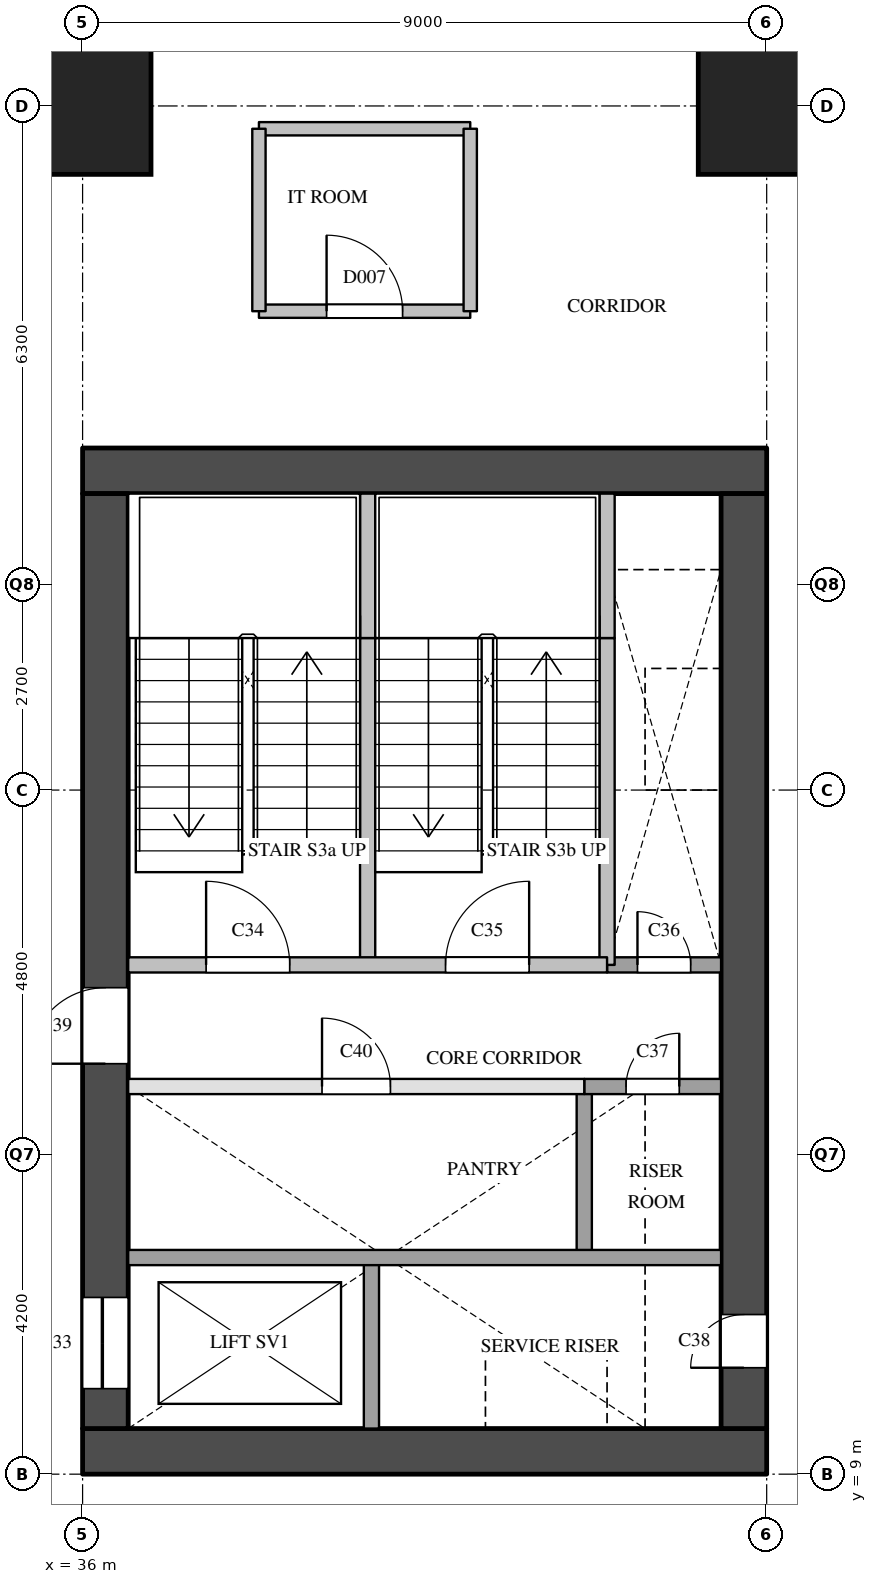
"""IFC4 building model, lengths in metres.
Left out: names, types, materials, properties, quantities, classifications, styles, units other than length and angle.
Written with IfcOpenShell. Run it as: python <this file> out.ifc"""

import sys

from ifc_helpers import new_model, si_unit, direction, frame, frame_2d, origin, origin_2d, place, context, subcontext, project, spatial, rectangle, extrude, element, fill, save


model = new_model("IFC4")
c1 = context("Model", 3, precision=1e-05, world=origin(), true_north=direction((0.0, 1.0)))
c2 = subcontext(c1, "Body", "Model", "MODEL_VIEW")
j1 = project(units=[si_unit("LENGTHUNIT", "METRE"), si_unit("PLANEANGLEUNIT", "RADIAN")], contexts=[c1])
p1 = place(None, origin())
s1 = spatial("IfcSite", under=j1, at=p1, CompositionType="ELEMENT")
p2 = place(p1, origin())
s2 = spatial("IfcBuilding", under=s1, at=p2, CompositionType="ELEMENT")
p3 = place(p2, frame((0.0, 0.0, 77.8)))
s3 = spatial("IfcBuildingStorey", under=s2, at=p3, CompositionType="ELEMENT", Elevation=77.8)
for number, where, z_axis, x_axis in (
    (1, (36.0, 27.0, 0.0), (0.0, 0.0, 1.0), (1.0, 0.0, 0.0)),
    (2, (45.0, 27.0, 0.0), (0.0, 0.0, 1.0), (1.0, 0.0, 0.0)),
):
    element("IfcColumn", number, at=place(p3, frame(where, z_axis=z_axis, x_axis=x_axis)), inside=s3, PredefinedType="COLUMN", context=c2, shape_type="SweptSolid", body=[
        extrude(rectangle(XDim=1.8, YDim=1.8, at=origin_2d()), origin(), (0.0, 0.0, 1.0), 3.8),
    ])
for number, where, z_axis, x_axis in (
    (3, (36.0, 9.3, 0.0), (0.0, 0.0, 1.0), (1.0, 0.0, 0.0)),
    (4, (36.0, 22.2, 0.0), (0.0, 0.0, 1.0), (1.0, 0.0, 0.0)),
):
    element("IfcWall", number, at=place(p3, frame(where, z_axis=z_axis, x_axis=x_axis)), inside=s3, PredefinedType="SHEAR", context=c2, shape_type="SweptSolid", body=[
        extrude(rectangle(XDim=9.0, YDim=0.6, at=frame_2d((4.5, 0.0))), origin(), (0.0, 0.0, 1.0), 3.5),
    ])
p4 = place(p3, frame((36.3, 9.6, 0.0), z_axis=(0.0, 0.0, 1.0), x_axis=(0.0, 1.0, 0.0)))
e5 = element("IfcWall", 5, at=p4, inside=s3, PredefinedType="SHEAR", context=c2, shape_type="SweptSolid", body=[
    extrude(rectangle(XDim=12.3, YDim=0.6, at=frame_2d((6.15, 0.0))), origin(), (0.0, 0.0, 1.0), 3.5),
])
p5 = place(p4, frame((0.525, 0.0, 0.0)))
e6 = element("IfcOpeningElement", 6, at=p5, cuts=e5, PredefinedType="OPENING", context=c2, shape_type="SweptSolid", body=[
    extrude(rectangle(XDim=1.2, YDim=2.1, at=frame_2d((0.6, 1.05))), frame((0.0, 0.31, 0.0), z_axis=(0.0, -1.0, 0.0), x_axis=(1.0, 0.0, 0.0)), (0.0, 0.0, 1.0), 0.62),
])
p6 = place(p4, frame((4.8, 0.0, 0.0)))
e7 = element("IfcOpeningElement", 7, at=p6, cuts=e5, PredefinedType="OPENING", context=c2, shape_type="SweptSolid", body=[
    extrude(rectangle(XDim=1.0, YDim=2.1, at=frame_2d((0.5, 1.05))), frame((0.0, 0.31, 0.0), z_axis=(0.0, -1.0, 0.0), x_axis=(1.0, 0.0, 0.0)), (0.0, 0.0, 1.0), 0.62),
])
p7 = place(p3, frame((44.7, 9.6, 0.0), z_axis=(0.0, 0.0, 1.0), x_axis=(0.0, 1.0, 0.0)))
e8 = element("IfcWall", 8, at=p7, inside=s3, PredefinedType="SHEAR", context=c2, shape_type="SweptSolid", body=[
    extrude(rectangle(XDim=12.3, YDim=0.6, at=frame_2d((6.15, 0.0))), origin(), (0.0, 0.0, 1.0), 3.5),
])
p8 = place(p7, frame((0.8, 0.0, 0.0)))
e9 = element("IfcOpeningElement", 9, at=p8, cuts=e8, PredefinedType="OPENING", context=c2, shape_type="SweptSolid", body=[
    extrude(rectangle(XDim=0.7, YDim=2.1, at=frame_2d((0.35, 1.05))), frame((0.0, 0.31, 0.0), z_axis=(0.0, -1.0, 0.0), x_axis=(1.0, 0.0, 0.0)), (0.0, 0.0, 1.0), 0.62),
])
p9 = place(p3, frame((39.75, 15.7, 0.0), z_axis=(0.0, 0.0, 1.0), x_axis=(0.0, 1.0, 0.0)))
e10 = element("IfcWall", 10, at=p9, inside=s3, PredefinedType="SOLIDWALL", context=c2, shape_type="SweptSolid", body=[
    extrude(rectangle(XDim=4.3, YDim=0.2, at=frame_2d((2.15, 0.0))), origin(), (0.0, 0.0, 1.0), 3.5),
])
p10 = place(p3, frame((39.75, 20.0, 0.0), z_axis=(0.0, 0.0, 1.0), x_axis=(0.0, 1.0, 0.0)))
e11 = element("IfcWall", 11, at=p10, inside=s3, PredefinedType="SOLIDWALL", context=c2, shape_type="SweptSolid", body=[
    extrude(rectangle(XDim=1.9, YDim=0.2, at=frame_2d((0.95, 0.0))), origin(), (0.0, 0.0, 1.0), 3.5),
])
p11 = place(p3, frame((39.8, 9.6, 0.0), z_axis=(0.0, 0.0, 1.0), x_axis=(0.0, 1.0, 0.0)))
e12 = element("IfcWall", 12, at=p11, inside=s3, PredefinedType="SOLIDWALL", context=c2, shape_type="SweptSolid", body=[
    extrude(rectangle(XDim=2.3, YDim=0.2, at=frame_2d((1.15, 0.0))), origin(), (0.0, 0.0, 1.0), 3.5),
])
p12 = place(p3, frame((42.6, 11.9, 0.0), z_axis=(0.0, 0.0, 1.0), x_axis=(0.0, 1.0, 0.0)))
e13 = element("IfcWall", 13, at=p12, inside=s3, PredefinedType="SOLIDWALL", context=c2, shape_type="SweptSolid", body=[
    extrude(rectangle(XDim=2.2, YDim=0.2, at=frame_2d((1.1, 0.0))), origin(), (0.0, 0.0, 1.0), 3.5),
])
p13 = place(p3, frame((42.9, 15.7, 0.0), z_axis=(0.0, 0.0, 1.0), x_axis=(0.0, 1.0, 0.0)))
e14 = element("IfcWall", 14, at=p13, inside=s3, PredefinedType="SOLIDWALL", context=c2, shape_type="SweptSolid", body=[
    extrude(rectangle(XDim=4.3, YDim=0.2, at=frame_2d((2.15, 0.0))), origin(), (0.0, 0.0, 1.0), 3.5),
])
p14 = place(p3, frame((42.9, 20.0, 0.0), z_axis=(0.0, 0.0, 1.0), x_axis=(0.0, 1.0, 0.0)))
e15 = element("IfcWall", 15, at=p14, inside=s3, PredefinedType="SOLIDWALL", context=c2, shape_type="SweptSolid", body=[
    extrude(rectangle(XDim=1.9, YDim=0.2, at=frame_2d((0.95, 0.0))), origin(), (0.0, 0.0, 1.0), 3.5),
])
p15 = place(p3, frame((36.6, 11.85, 0.0), z_axis=(0.0, 0.0, 1.0), x_axis=(1.0, 0.0, 0.0)))
e16 = element("IfcWall", 16, at=p15, inside=s3, PredefinedType="SOLIDWALL", context=c2, shape_type="SweptSolid", body=[
    extrude(rectangle(XDim=7.8, YDim=0.2, at=frame_2d((3.9, 0.0))), origin(), (0.0, 0.0, 1.0), 3.5),
])
p16 = place(p3, frame((36.6, 14.1, 0.0), z_axis=(0.0, 0.0, 1.0), x_axis=(1.0, 0.0, 0.0)))
e17 = element("IfcWall", 17, at=p16, inside=s3, PredefinedType="PARTITIONING", context=c2, shape_type="SweptSolid", body=[
    extrude(rectangle(XDim=6.0, YDim=0.2, at=frame_2d((3.0, 0.0))), origin(), (0.0, 0.0, 1.0), 3.5),
])
p17 = place(p16, frame((2.55, 0.0, 0.0)))
e18 = element("IfcOpeningElement", 18, at=p17, cuts=e17, PredefinedType="OPENING", context=c2, shape_type="SweptSolid", body=[
    extrude(rectangle(XDim=0.9, YDim=2.1, at=frame_2d((0.45, 1.05))), frame((0.0, 0.11, 0.0), z_axis=(0.0, -1.0, 0.0), x_axis=(1.0, 0.0, 0.0)), (0.0, 0.0, 1.0), 0.22),
])
p18 = place(p3, frame((42.6, 14.1, 0.0), z_axis=(0.0, 0.0, 1.0), x_axis=(1.0, 0.0, 0.0)))
e19 = element("IfcWall", 19, at=p18, inside=s3, PredefinedType="SOLIDWALL", context=c2, shape_type="SweptSolid", body=[
    extrude(rectangle(XDim=1.8, YDim=0.2, at=frame_2d((0.9, 0.0))), origin(), (0.0, 0.0, 1.0), 3.5),
])
p19 = place(p18, frame((0.55, 0.0, 0.0)))
e20 = element("IfcOpeningElement", 20, at=p19, cuts=e19, PredefinedType="OPENING", context=c2, shape_type="SweptSolid", body=[
    extrude(rectangle(XDim=0.7, YDim=2.1, at=frame_2d((0.35, 1.05))), frame((0.0, 0.11, 0.0), z_axis=(0.0, -1.0, 0.0), x_axis=(1.0, 0.0, 0.0)), (0.0, 0.0, 1.0), 0.22),
])
p20 = place(p3, frame((42.9, 15.7, 0.0), z_axis=(0.0, 0.0, 1.0), x_axis=(1.0, 0.0, 0.0)))
e21 = element("IfcWall", 21, at=p20, inside=s3, PredefinedType="SOLIDWALL", context=c2, shape_type="SweptSolid", body=[
    extrude(rectangle(XDim=1.5, YDim=0.2, at=frame_2d((0.75, 0.0))), origin(), (0.0, 0.0, 1.0), 3.5),
])
p21 = place(p20, frame((0.4, 0.0, 0.0)))
e22 = element("IfcOpeningElement", 22, at=p21, cuts=e21, PredefinedType="OPENING", context=c2, shape_type="SweptSolid", body=[
    extrude(rectangle(XDim=0.7, YDim=2.1, at=frame_2d((0.35, 1.05))), frame((0.0, 0.11, 0.0), z_axis=(0.0, -1.0, 0.0), x_axis=(1.0, 0.0, 0.0)), (0.0, 0.0, 1.0), 0.22),
])
p22 = place(p3, frame((36.6, 15.7, 0.0), z_axis=(0.0, 0.0, 1.0), x_axis=(1.0, 0.0, 0.0)))
e23 = element("IfcWall", 23, at=p22, inside=s3, PredefinedType="SOLIDWALL", context=c2, shape_type="SweptSolid", body=[
    extrude(rectangle(XDim=6.3, YDim=0.2, at=frame_2d((3.15, 0.0))), origin(), (0.0, 0.0, 1.0), 3.5),
])
p23 = place(p22, frame((1.025, 0.0, 0.0)))
e24 = element("IfcOpeningElement", 24, at=p23, cuts=e23, PredefinedType="OPENING", context=c2, shape_type="SweptSolid", body=[
    extrude(rectangle(XDim=1.1, YDim=2.1, at=frame_2d((0.55, 1.05))), frame((0.0, 0.11, 0.0), z_axis=(0.0, -1.0, 0.0), x_axis=(1.0, 0.0, 0.0)), (0.0, 0.0, 1.0), 0.22),
])
p24 = place(p22, frame((4.175, 0.0, 0.0)))
e25 = element("IfcOpeningElement", 25, at=p24, cuts=e23, PredefinedType="OPENING", context=c2, shape_type="SweptSolid", body=[
    extrude(rectangle(XDim=1.1, YDim=2.1, at=frame_2d((0.55, 1.05))), frame((0.0, 0.11, 0.0), z_axis=(0.0, -1.0, 0.0), x_axis=(1.0, 0.0, 0.0)), (0.0, 0.0, 1.0), 0.22),
])
p25 = place(p3, frame((38.32, 24.3, 0.0), z_axis=(0.0, 0.0, 1.0), x_axis=(1.0, 0.0, 0.0)))
e26 = element("IfcWall", 26, at=p25, inside=s3, PredefinedType="PARTITIONING", context=c2, shape_type="SweptSolid", body=[
    extrude(rectangle(XDim=2.78, YDim=0.175, at=frame_2d((1.39, 0.0))), origin(), (0.0, 0.0, 1.0), 3.5),
])
p26 = place(p25, frame((0.89, 0.0, 0.0)))
e27 = element("IfcOpeningElement", 27, at=p26, cuts=e26, PredefinedType="OPENING", context=c2, shape_type="SweptSolid", body=[
    extrude(rectangle(XDim=1.0, YDim=2.1, at=frame_2d((0.5, 1.05))), frame((0.0, 0.097, 0.0), z_axis=(0.0, -1.0, 0.0), x_axis=(1.0, 0.0, 0.0)), (0.0, 0.0, 1.0), 0.195),
])
p27 = place(p3, frame((38.32, 26.7, 0.0), z_axis=(0.0, 0.0, 1.0), x_axis=(1.0, 0.0, 0.0)))
e28 = element("IfcWall", 28, at=p27, inside=s3, PredefinedType="PARTITIONING", context=c2, shape_type="SweptSolid", body=[
    extrude(rectangle(XDim=2.78, YDim=0.175, at=frame_2d((1.39, 0.0))), origin(), (0.0, 0.0, 1.0), 2.5),
])
for number, where, z_axis, x_axis in (
    (29, (38.32, 24.3, 0.0), (0.0, 0.0, 1.0), (0.0, 1.0, 0.0)),
    (30, (41.1, 24.3, 0.0), (0.0, 0.0, 1.0), (0.0, 1.0, 0.0)),
):
    element("IfcWall", number, at=place(p3, frame(where, z_axis=z_axis, x_axis=x_axis)), inside=s3, PredefinedType="PARTITIONING", context=c2, shape_type="SweptSolid", body=[
        extrude(rectangle(XDim=2.4, YDim=0.175, at=frame_2d((1.2, 0.0))), origin(), (0.0, 0.0, 1.0), 2.5),
    ])
p28 = place(p5, origin())
e31 = element("IfcDoor", 31, at=p28, inside=s3, OperationType="SLIDING_TO_LEFT", PredefinedType="DOOR", context=c2, shape_type="SweptSolid", body=[
    extrude(rectangle(XDim=1.2, YDim=2.1, at=frame_2d((0.6, 1.05))), frame((0.0, 0.025, 0.0), z_axis=(0.0, -1.0, 0.0), x_axis=(1.0, 0.0, 0.0)), (0.0, 0.0, 1.0), 0.05),
])
fill(e6, e31)
p29 = place(p23, origin())
e32 = element("IfcDoor", 32, at=p29, inside=s3, OperationType="SINGLE_SWING_LEFT", PredefinedType="DOOR", context=c2, shape_type="SweptSolid", body=[
    extrude(rectangle(XDim=1.1, YDim=2.1, at=frame_2d((0.55, 1.05))), frame((0.0, 0.025, 0.0), z_axis=(0.0, -1.0, 0.0), x_axis=(1.0, 0.0, 0.0)), (0.0, 0.0, 1.0), 0.05),
])
fill(e24, e32)
p30 = place(p24, origin())
e33 = element("IfcDoor", 33, at=p30, inside=s3, OperationType="SINGLE_SWING_RIGHT", PredefinedType="DOOR", context=c2, shape_type="SweptSolid", body=[
    extrude(rectangle(XDim=1.1, YDim=2.1, at=frame_2d((0.55, 1.05))), frame((0.0, 0.025, 0.0), z_axis=(0.0, -1.0, 0.0), x_axis=(1.0, 0.0, 0.0)), (0.0, 0.0, 1.0), 0.05),
])
fill(e25, e33)
p31 = place(p21, origin())
e34 = element("IfcDoor", 34, at=p31, inside=s3, OperationType="SINGLE_SWING_LEFT", PredefinedType="DOOR", context=c2, shape_type="SweptSolid", body=[
    extrude(rectangle(XDim=0.7, YDim=2.1, at=frame_2d((0.35, 1.05))), frame((0.0, 0.025, 0.0), z_axis=(0.0, -1.0, 0.0), x_axis=(1.0, 0.0, 0.0)), (0.0, 0.0, 1.0), 0.05),
])
fill(e22, e34)
p32 = place(p19, origin())
e35 = element("IfcDoor", 35, at=p32, inside=s3, OperationType="SINGLE_SWING_RIGHT", PredefinedType="DOOR", context=c2, shape_type="SweptSolid", body=[
    extrude(rectangle(XDim=0.7, YDim=2.1, at=frame_2d((0.35, 1.05))), frame((0.0, 0.025, 0.0), z_axis=(0.0, -1.0, 0.0), x_axis=(1.0, 0.0, 0.0)), (0.0, 0.0, 1.0), 0.05),
])
fill(e20, e35)
p33 = place(p8, origin())
e36 = element("IfcDoor", 36, at=p33, inside=s3, OperationType="SINGLE_SWING_LEFT", PredefinedType="DOOR", context=c2, shape_type="SweptSolid", body=[
    extrude(rectangle(XDim=0.7, YDim=2.1, at=frame_2d((0.35, 1.05))), frame((0.0, 0.025, 0.0), z_axis=(0.0, -1.0, 0.0), x_axis=(1.0, 0.0, 0.0)), (0.0, 0.0, 1.0), 0.05),
])
fill(e9, e36)
p34 = place(p6, origin())
e37 = element("IfcDoor", 37, at=p34, inside=s3, OperationType="SINGLE_SWING_LEFT", PredefinedType="DOOR", context=c2, shape_type="SweptSolid", body=[
    extrude(rectangle(XDim=1.0, YDim=2.1, at=frame_2d((0.5, 1.05))), frame((0.0, 0.025, 0.0), z_axis=(0.0, -1.0, 0.0), x_axis=(1.0, 0.0, 0.0)), (0.0, 0.0, 1.0), 0.05),
])
fill(e7, e37)
p35 = place(p17, origin())
e38 = element("IfcDoor", 38, at=p35, inside=s3, OperationType="SINGLE_SWING_LEFT", PredefinedType="DOOR", context=c2, shape_type="SweptSolid", body=[
    extrude(rectangle(XDim=0.9, YDim=2.1, at=frame_2d((0.45, 1.05))), frame((0.0, 0.025, 0.0), z_axis=(0.0, -1.0, 0.0), x_axis=(1.0, 0.0, 0.0)), (0.0, 0.0, 1.0), 0.05),
])
fill(e18, e38)
p36 = place(p26, origin())
e39 = element("IfcDoor", 39, at=p36, inside=s3, OperationType="SINGLE_SWING_LEFT", PredefinedType="DOOR", context=c2, shape_type="SweptSolid", body=[
    extrude(rectangle(XDim=1.0, YDim=2.1, at=frame_2d((0.5, 1.05))), frame((0.0, 0.025, 0.0), z_axis=(0.0, -1.0, 0.0), x_axis=(1.0, 0.0, 0.0)), (0.0, 0.0, 1.0), 0.05),
])
fill(e27, e39)
save(model, sys.argv[1])
